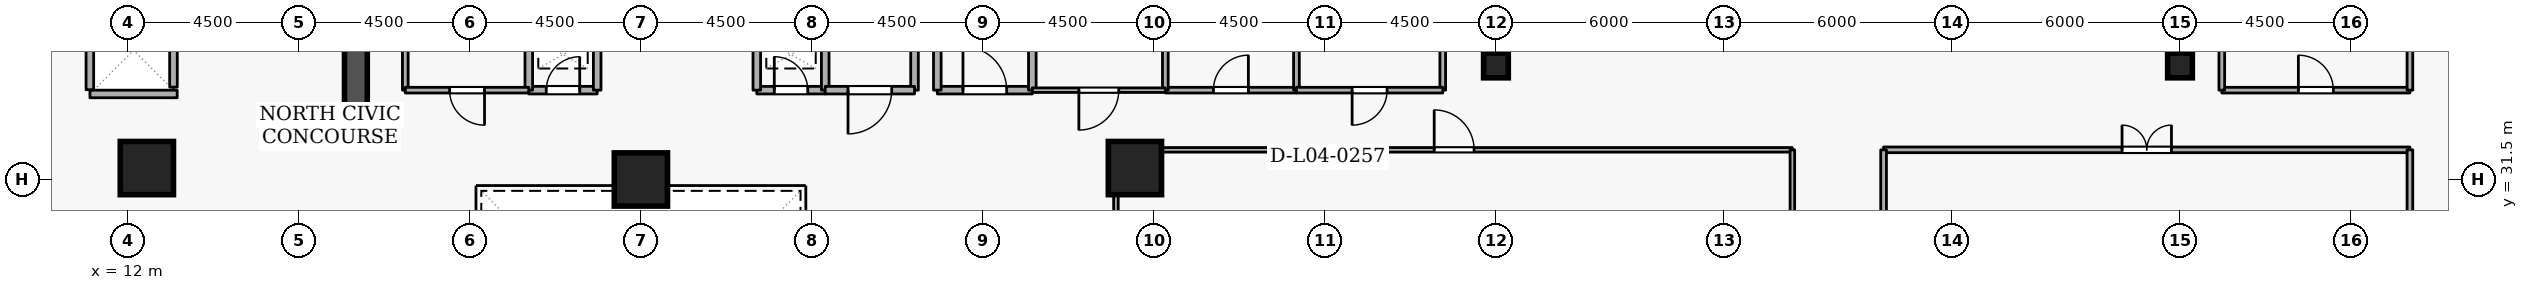
"""IFC4 building model, lengths in metres.
Left out: names, types, materials, properties, quantities, classifications, styles, units other than length and angle.
Written with IfcOpenShell. Run it as: python <this file> out.ifc"""

import sys

from ifc_helpers import new_model, si_unit, direction, frame, frame_2d, origin, origin_2d, place, context, subcontext, project, spatial, rectangle, extrude, element, fill, save


model = new_model("IFC4")
c1 = context("Model", 3, precision=1e-05, world=origin(), true_north=direction((0.0, 1.0)))
c2 = subcontext(c1, "Body", "Model", "MODEL_VIEW")
j1 = project(units=[si_unit("LENGTHUNIT", "METRE"), si_unit("PLANEANGLEUNIT", "RADIAN")], contexts=[c1])
p1 = place(None, origin())
s1 = spatial("IfcSite", under=j1, at=p1, CompositionType="ELEMENT")
p2 = place(p1, origin())
s2 = spatial("IfcBuilding", under=s1, at=p2, CompositionType="ELEMENT")
p3 = place(p2, frame((0.0, 0.0, 18.6)))
s3 = spatial("IfcBuildingStorey", under=s2, at=p3, CompositionType="ELEMENT", Elevation=18.6)
p4 = place(p3, frame((18.0, 33.1, 0.0), z_axis=(0.0, 0.0, 1.0), x_axis=(0.0, 1.0, 0.0)))
e1 = element("IfcWall", 1, at=p4, inside=s3, PredefinedType="SHEAR", context=c2, shape_type="SweptSolid", body=[
    extrude(rectangle(XDim=5.7, YDim=0.6, at=frame_2d((2.85, 0.0))), origin(), (0.0, 0.0, 1.0), 4.5),
])
for number, where, z_axis, x_axis in (
    (2, (12.5, 31.8, 0.0), (0.0, 0.0, 1.0), (1.0, 0.0, 0.0)),
    (3, (38.5, 31.8, 0.0), (0.0, 0.0, 1.0), (1.0, 0.0, 0.0)),
    (4, (25.5, 31.5, 0.0), (0.0, 0.0, 1.0), (1.0, 0.0, 0.0)),
):
    element("IfcColumn", number, at=place(p3, frame(where, z_axis=z_axis, x_axis=x_axis)), inside=s3, PredefinedType="COLUMN", context=c2, shape_type="SweptSolid", body=[
        extrude(rectangle(XDim=1.4, YDim=1.4, at=origin_2d()), origin(), (0.0, 0.0, 1.0), 4.5),
    ])
for number, where, z_axis, x_axis in (
    (5, (48.0, 34.5, 0.0), (0.0, 0.0, 1.0), (1.0, 0.0, 0.0)),
    (6, (66.0, 34.5, 0.0), (0.0, 0.0, 1.0), (1.0, 0.0, 0.0)),
):
    element("IfcColumn", number, at=place(p3, frame(where, z_axis=z_axis, x_axis=x_axis)), inside=s3, PredefinedType="COLUMN", context=c2, shape_type="SweptSolid", body=[
        extrude(rectangle(XDim=0.65, YDim=0.65, at=origin_2d()), origin(), (0.0, 0.0, 1.0), 4.5),
    ])
p5 = place(p3, frame((13.2, 33.93, 0.0), z_axis=(0.0, 0.0, 1.0), x_axis=(0.0, 1.0, 0.0)))
e7 = element("IfcWall", 7, at=p5, inside=s3, PredefinedType="STANDARD", context=c2, shape_type="SweptSolid", body=[
    extrude(rectangle(XDim=1.94, YDim=0.2, at=frame_2d((0.97, 0.0))), origin(), (0.0, 0.0, 1.0), 4.16),
])
p6 = place(p3, frame((11.002, 33.75, 0.0), z_axis=(0.0, 0.0, 1.0), x_axis=(1.0, 0.0, 0.0)))
e8 = element("IfcWall", 8, at=p6, inside=s3, PredefinedType="STANDARD", context=c2, shape_type="SweptSolid", body=[
    extrude(rectangle(XDim=2.296, YDim=0.2, at=frame_2d((1.148, 0.0))), origin(), (0.0, 0.0, 1.0), 4.16),
])
p7 = place(p3, frame((11.0, 33.862, 0.0), z_axis=(0.0, 0.0, 1.0), x_axis=(0.0, 1.0, 0.0)))
e9 = element("IfcWall", 9, at=p7, inside=s3, PredefinedType="STANDARD", context=c2, shape_type="SweptSolid", body=[
    extrude(rectangle(XDim=2.076, YDim=0.2, at=frame_2d((1.038, 0.0))), origin(), (0.0, 0.0, 1.0), 4.16),
])
p8 = place(p3, frame((33.3, 33.85, 0.0), z_axis=(0.0, 0.0, 1.0), x_axis=(1.0, 0.0, 0.0)))
e10 = element("IfcWall", 10, at=p8, inside=s3, PredefinedType="STANDARD", context=c2, shape_type="SweptSolid", body=[
    extrude(rectangle(XDim=2.5, YDim=0.2, at=frame_2d((1.25, 0.0))), origin(), (0.0, 0.0, 1.0), 4.16),
])
p9 = place(p8, frame((0.675, 0.0, 0.0)))
e11 = element("IfcOpeningElement", 11, at=p9, cuts=e10, PredefinedType="OPENING", context=c2, shape_type="SweptSolid", body=[
    extrude(rectangle(XDim=1.15, YDim=2.1, at=frame_2d((0.575, 1.05))), frame((0.0, 0.11, 0.0), z_axis=(0.0, -1.0, 0.0), x_axis=(1.0, 0.0, 0.0)), (0.0, 0.0, 1.0), 0.22),
])
p10 = place(p3, frame((35.8, 33.85, 0.0), z_axis=(0.0, 0.0, 1.0), x_axis=(0.0, 1.0, 0.0)))
e12 = element("IfcWall", 12, at=p10, inside=s3, PredefinedType="STANDARD", context=c2, shape_type="SweptSolid", body=[
    extrude(rectangle(XDim=5.15, YDim=0.2, at=frame_2d((2.575, 0.0))), origin(), (0.0, 0.0, 1.0), 4.16),
])
p11 = place(p3, frame((33.3, 35.6, 0.0), z_axis=(0.0, 0.0, 1.0), x_axis=(0.0, -1.0, 0.0)))
e13 = element("IfcWall", 13, at=p11, inside=s3, PredefinedType="STANDARD", context=c2, shape_type="SweptSolid", body=[
    extrude(rectangle(XDim=1.75, YDim=0.2, at=frame_2d((0.875, 0.0))), origin(), (0.0, 0.0, 1.0), 3.365),
])
p12 = place(p3, frame((22.55, 33.85, 0.0), z_axis=(0.0, 0.0, 1.0), x_axis=(1.0, 0.0, 0.0)))
e14 = element("IfcWall", 14, at=p12, inside=s3, PredefinedType="STANDARD", context=c2, shape_type="SweptSolid", body=[
    extrude(rectangle(XDim=1.8, YDim=0.2, at=frame_2d((0.9, 0.0))), origin(), (0.0, 0.0, 1.0), 4.16),
])
p13 = place(p12, frame((0.46, 0.0, 0.0)))
e15 = element("IfcOpeningElement", 15, at=p13, cuts=e14, PredefinedType="OPENING", context=c2, shape_type="SweptSolid", body=[
    extrude(rectangle(XDim=0.88, YDim=2.04, at=frame_2d((0.44, 1.02))), frame((0.0, 0.11, 0.0), z_axis=(0.0, -1.0, 0.0), x_axis=(1.0, 0.0, 0.0)), (0.0, 0.0, 1.0), 0.22),
])
for number, where, z_axis, x_axis in (
    (16, (24.35, 33.85, 0.0), (0.0, 0.0, 1.0), (0.0, 1.0, 0.0)),
    (17, (22.55, 35.35, 0.0), (0.0, 0.0, 1.0), (0.0, -1.0, 0.0)),
):
    element("IfcWall", number, at=place(p3, frame(where, z_axis=z_axis, x_axis=x_axis)), inside=s3, PredefinedType="STANDARD", context=c2, shape_type="SweptSolid", body=[
        extrude(rectangle(XDim=1.5, YDim=0.2, at=frame_2d((0.75, 0.0))), origin(), (0.0, 0.0, 1.0), 4.16),
    ])
p14 = place(p3, frame((28.55, 33.85, 0.0), z_axis=(0.0, 0.0, 1.0), x_axis=(1.0, 0.0, 0.0)))
e18 = element("IfcWall", 18, at=p14, inside=s3, PredefinedType="STANDARD", context=c2, shape_type="SweptSolid", body=[
    extrude(rectangle(XDim=1.8, YDim=0.2, at=frame_2d((0.9, 0.0))), origin(), (0.0, 0.0, 1.0), 4.16),
])
p15 = place(p14, frame((0.46, 0.0, 0.0)))
e19 = element("IfcOpeningElement", 19, at=p15, cuts=e18, PredefinedType="OPENING", context=c2, shape_type="SweptSolid", body=[
    extrude(rectangle(XDim=0.88, YDim=2.04, at=frame_2d((0.44, 1.02))), frame((0.0, 0.11, 0.0), z_axis=(0.0, -1.0, 0.0), x_axis=(1.0, 0.0, 0.0)), (0.0, 0.0, 1.0), 0.22),
])
for number, where, z_axis, x_axis in (
    (20, (30.35, 33.85, 0.0), (0.0, 0.0, 1.0), (0.0, 1.0, 0.0)),
    (21, (28.55, 35.35, 0.0), (0.0, 0.0, 1.0), (0.0, -1.0, 0.0)),
):
    element("IfcWall", number, at=place(p3, frame(where, z_axis=z_axis, x_axis=x_axis)), inside=s3, PredefinedType="STANDARD", context=c2, shape_type="SweptSolid", body=[
        extrude(rectangle(XDim=1.5, YDim=0.2, at=frame_2d((0.75, 0.0))), origin(), (0.0, 0.0, 1.0), 4.16),
    ])
p16 = place(p3, frame((32.7, 35.35, 0.0), z_axis=(0.0, 0.0, 1.0), x_axis=(0.0, -1.0, 0.0)))
e22 = element("IfcWall", 22, at=p16, inside=s3, PredefinedType="STANDARD", context=c2, shape_type="SweptSolid", body=[
    extrude(rectangle(XDim=1.5, YDim=0.2, at=frame_2d((0.75, 0.0))), origin(), (0.0, 0.0, 1.0), 3.365),
])
p17 = place(p3, frame((32.7, 33.85, 0.0), z_axis=(0.0, 0.0, 1.0), x_axis=(-1.0, 0.0, 0.0)))
e23 = element("IfcWall", 23, at=p17, inside=s3, PredefinedType="STANDARD", context=c2, shape_type="SweptSolid", body=[
    extrude(rectangle(XDim=2.35, YDim=0.2, at=frame_2d((1.175, 0.0))), origin(), (0.0, 0.0, 1.0), 4.16),
])
p18 = place(p17, frame((0.6, 0.0, 0.0)))
e24 = element("IfcOpeningElement", 24, at=p18, cuts=e23, PredefinedType="OPENING", context=c2, shape_type="SweptSolid", body=[
    extrude(rectangle(XDim=1.15, YDim=2.1, at=frame_2d((0.575, 1.05))), frame((0.0, 0.11, 0.0), z_axis=(0.0, -1.0, 0.0), x_axis=(1.0, 0.0, 0.0)), (0.0, 0.0, 1.0), 0.22),
])
p19 = place(p3, frame((19.3, 33.85, 0.0), z_axis=(0.0, 0.0, 1.0), x_axis=(0.0, 1.0, 0.0)))
e25 = element("IfcWall", 25, at=p19, inside=s3, PredefinedType="PARTITIONING", context=c2, shape_type="SweptSolid", body=[
    extrude(rectangle(XDim=1.5, YDim=0.15, at=frame_2d((0.75, 0.0))), origin(), (0.0, 0.0, 1.0), 4.16),
])
p20 = place(p3, frame((22.55, 33.85, 0.0), z_axis=(0.0, 0.0, 1.0), x_axis=(-1.0, 0.0, 0.0)))
e26 = element("IfcWall", 26, at=p20, inside=s3, PredefinedType="PARTITIONING", context=c2, shape_type="SweptSolid", body=[
    extrude(rectangle(XDim=3.25, YDim=0.15, at=frame_2d((1.625, 0.0))), origin(), (0.0, 0.0, 1.0), 4.16),
])
p21 = place(p20, frame((1.165, 0.0, 0.0)))
e27 = element("IfcOpeningElement", 27, at=p21, cuts=e26, PredefinedType="OPENING", context=c2, shape_type="SweptSolid", body=[
    extrude(rectangle(XDim=0.92, YDim=2.08, at=frame_2d((0.46, 1.04))), frame((0.0, 0.085, 0.0), z_axis=(0.0, -1.0, 0.0), x_axis=(1.0, 0.0, 0.0)), (0.0, 0.0, 1.0), 0.17),
])
p22 = place(p3, frame((39.3, 33.85, 0.0), z_axis=(0.0, 0.0, 1.0), x_axis=(1.0, 0.0, 0.0)))
e28 = element("IfcWall", 28, at=p22, inside=s3, PredefinedType="PARTITIONING", context=c2, shape_type="SweptSolid", body=[
    extrude(rectangle(XDim=3.45, YDim=0.15, at=frame_2d((1.725, 0.0))), origin(), (0.0, 0.0, 1.0), 4.16),
])
p23 = place(p22, frame((1.265, 0.0, 0.0)))
e29 = element("IfcOpeningElement", 29, at=p23, cuts=e28, PredefinedType="OPENING", context=c2, shape_type="SweptSolid", body=[
    extrude(rectangle(XDim=0.92, YDim=2.08, at=frame_2d((0.46, 1.04))), frame((0.0, 0.085, 0.0), z_axis=(0.0, -1.0, 0.0), x_axis=(1.0, 0.0, 0.0)), (0.0, 0.0, 1.0), 0.17),
])
p24 = place(p3, frame((42.75, 33.85, 0.0), z_axis=(0.0, 0.0, 1.0), x_axis=(0.0, 1.0, 0.0)))
e30 = element("IfcWall", 30, at=p24, inside=s3, PredefinedType="PARTITIONING", context=c2, shape_type="SweptSolid", body=[
    extrude(rectangle(XDim=3.95, YDim=0.15, at=frame_2d((1.975, 0.0))), origin(), (0.0, 0.0, 1.0), 3.395),
])
p25 = place(p3, frame((39.3, 37.8, 0.0), z_axis=(0.0, 0.0, 1.0), x_axis=(0.0, -1.0, 0.0)))
e31 = element("IfcWall", 31, at=p25, inside=s3, PredefinedType="PARTITIONING", context=c2, shape_type="SweptSolid", body=[
    extrude(rectangle(XDim=3.95, YDim=0.15, at=frame_2d((1.975, 0.0))), origin(), (0.0, 0.0, 1.0), 4.16),
])
p26 = place(p3, frame((67.1, 33.85, 0.0), z_axis=(0.0, 0.0, 1.0), x_axis=(1.0, 0.0, 0.0)))
e32 = element("IfcWall", 32, at=p26, inside=s3, PredefinedType="PARTITIONING", context=c2, shape_type="SweptSolid", body=[
    extrude(rectangle(XDim=4.95, YDim=0.15, at=frame_2d((2.475, 0.0))), origin(), (0.0, 0.0, 1.0), 4.16),
])
p27 = place(p26, frame((2.015, 0.0, 0.0)))
e33 = element("IfcOpeningElement", 33, at=p27, cuts=e32, PredefinedType="OPENING", context=c2, shape_type="SweptSolid", body=[
    extrude(rectangle(XDim=0.92, YDim=2.08, at=frame_2d((0.46, 1.04))), frame((0.0, 0.085, 0.0), z_axis=(0.0, -1.0, 0.0), x_axis=(1.0, 0.0, 0.0)), (0.0, 0.0, 1.0), 0.17),
])
for number, where, z_axis, x_axis in (
    (34, (72.05, 33.85, 0.0), (0.0, 0.0, 1.0), (0.0, 1.0, 0.0)),
    (35, (67.1, 37.8, 0.0), (0.0, 0.0, 1.0), (0.0, -1.0, 0.0)),
    (36, (46.6, 37.8, 0.0), (0.0, 0.0, 1.0), (0.0, -1.0, 0.0)),
):
    element("IfcWall", number, at=place(p3, frame(where, z_axis=z_axis, x_axis=x_axis)), inside=s3, PredefinedType="PARTITIONING", context=c2, shape_type="SweptSolid", body=[
        extrude(rectangle(XDim=3.95, YDim=0.15, at=frame_2d((1.975, 0.0))), origin(), (0.0, 0.0, 1.0), 4.16),
    ])
p28 = place(p3, frame((46.6, 33.85, 0.0), z_axis=(0.0, 0.0, 1.0), x_axis=(-1.0, 0.0, 0.0)))
e37 = element("IfcWall", 37, at=p28, inside=s3, PredefinedType="PARTITIONING", context=c2, shape_type="SweptSolid", body=[
    extrude(rectangle(XDim=3.85, YDim=0.15, at=frame_2d((1.925, 0.0))), origin(), (0.0, 0.0, 1.0), 4.16),
])
p29 = place(p28, frame((1.465, 0.0, 0.0)))
e38 = element("IfcOpeningElement", 38, at=p29, cuts=e37, PredefinedType="OPENING", context=c2, shape_type="SweptSolid", body=[
    extrude(rectangle(XDim=0.92, YDim=2.08, at=frame_2d((0.46, 1.04))), frame((0.0, 0.085, 0.0), z_axis=(0.0, -1.0, 0.0), x_axis=(1.0, 0.0, 0.0)), (0.0, 0.0, 1.0), 0.17),
])
p30 = place(p3, frame((38.0, 32.28, 0.0), z_axis=(0.0, 0.0, 1.0), x_axis=(1.0, 0.0, 0.0)))
e39 = element("IfcWall", 39, at=p30, inside=s3, PredefinedType="PARTITIONING", context=c2, shape_type="SweptSolid", body=[
    extrude(rectangle(XDim=17.8, YDim=0.12, at=frame_2d((8.9, 0.0))), origin(), (0.0, 0.0, 1.0), 4.16),
])
p31 = place(p30, frame((8.375, 0.0, 0.0)))
e40 = element("IfcOpeningElement", 40, at=p31, cuts=e39, PredefinedType="OPENING", context=c2, shape_type="SweptSolid", body=[
    extrude(rectangle(XDim=1.05, YDim=2.1, at=frame_2d((0.525, 1.05))), frame((0.0, 0.07, 0.0), z_axis=(0.0, -1.0, 0.0), x_axis=(1.0, 0.0, 0.0)), (0.0, 0.0, 1.0), 0.14),
])
for number, where, z_axis, x_axis in (
    (41, (55.8, 32.28, 0.0), (0.0, 0.0, 1.0), (0.0, -1.0, 0.0)),
    (42, (38.0, 22.3, 0.0), (0.0, 0.0, 1.0), (0.0, 1.0, 0.0)),
):
    element("IfcWall", number, at=place(p3, frame(where, z_axis=z_axis, x_axis=x_axis)), inside=s3, PredefinedType="PARTITIONING", context=c2, shape_type="SweptSolid", body=[
        extrude(rectangle(XDim=9.98, YDim=0.12, at=frame_2d((4.99, 0.0))), origin(), (0.0, 0.0, 1.0), 4.16),
    ])
p32 = place(p3, frame((58.2, 32.28, 0.0), z_axis=(0.0, 0.0, 1.0), x_axis=(1.0, 0.0, 0.0)))
e43 = element("IfcWall", 43, at=p32, inside=s3, PredefinedType="PARTITIONING", context=c2, shape_type="SweptSolid", body=[
    extrude(rectangle(XDim=13.85, YDim=0.15, at=frame_2d((6.925, 0.0))), origin(), (0.0, 0.0, 1.0), 4.16),
])
p33 = place(p32, frame((6.275, 0.0, 0.0)))
e44 = element("IfcOpeningElement", 44, at=p33, cuts=e43, PredefinedType="OPENING", context=c2, shape_type="SweptSolid", body=[
    extrude(rectangle(XDim=1.3, YDim=2.12, at=frame_2d((0.65, 1.06))), frame((0.0, 0.085, 0.0), z_axis=(0.0, -1.0, 0.0), x_axis=(1.0, 0.0, 0.0)), (0.0, 0.0, 1.0), 0.17),
])
for number, where, z_axis, x_axis in (
    (45, (72.05, 32.28, 0.0), (0.0, 0.0, 1.0), (0.0, -1.0, 0.0)),
    (46, (58.2, 22.3, 0.0), (0.0, 0.0, 1.0), (0.0, 1.0, 0.0)),
):
    element("IfcWall", number, at=place(p3, frame(where, z_axis=z_axis, x_axis=x_axis)), inside=s3, PredefinedType="PARTITIONING", context=c2, shape_type="SweptSolid", body=[
        extrude(rectangle(XDim=9.98, YDim=0.15, at=frame_2d((4.99, 0.0))), origin(), (0.0, 0.0, 1.0), 4.16),
    ])
p34 = place(p3, frame((39.3, 33.85, 0.0), z_axis=(0.0, 0.0, 1.0), x_axis=(-1.0, 0.0, 0.0)))
e47 = element("IfcWall", 47, at=p34, inside=s3, PredefinedType="PARTITIONING", context=c2, shape_type="SweptSolid", body=[
    extrude(rectangle(XDim=3.5, YDim=0.12, at=frame_2d((1.75, 0.0))), origin(), (0.0, 0.0, 1.0), 4.16),
])
p35 = place(p34, frame((1.225, 0.0, 0.0)))
e48 = element("IfcOpeningElement", 48, at=p35, cuts=e47, PredefinedType="OPENING", context=c2, shape_type="SweptSolid", body=[
    extrude(rectangle(XDim=1.05, YDim=2.1, at=frame_2d((0.525, 1.05))), frame((0.0, 0.07, 0.0), z_axis=(0.0, -1.0, 0.0), x_axis=(1.0, 0.0, 0.0)), (0.0, 0.0, 1.0), 0.14),
])
p36 = place(p9, origin())
e49 = element("IfcDoor", 49, at=p36, inside=s3, OperationType="SINGLE_SWING_LEFT", PredefinedType="DOOR", context=c2, shape_type="SweptSolid", body=[
    extrude(rectangle(XDim=1.15, YDim=2.1, at=frame_2d((0.575, 1.05))), frame((0.0, 0.025, 0.0), z_axis=(0.0, -1.0, 0.0), x_axis=(1.0, 0.0, 0.0)), (0.0, 0.0, 1.0), 0.05),
])
fill(e11, e49)
p37 = place(p13, origin())
e50 = element("IfcDoor", 50, at=p37, inside=s3, OperationType="SINGLE_SWING_RIGHT", PredefinedType="DOOR", context=c2, shape_type="SweptSolid", body=[
    extrude(rectangle(XDim=0.88, YDim=2.04, at=frame_2d((0.44, 1.02))), frame((0.0, 0.025, 0.0), z_axis=(0.0, -1.0, 0.0), x_axis=(1.0, 0.0, 0.0)), (0.0, 0.0, 1.0), 0.05),
])
fill(e15, e50)
p38 = place(p15, origin())
e51 = element("IfcDoor", 51, at=p38, inside=s3, OperationType="SINGLE_SWING_LEFT", PredefinedType="DOOR", context=c2, shape_type="SweptSolid", body=[
    extrude(rectangle(XDim=0.88, YDim=2.04, at=frame_2d((0.44, 1.02))), frame((0.0, 0.025, 0.0), z_axis=(0.0, -1.0, 0.0), x_axis=(1.0, 0.0, 0.0)), (0.0, 0.0, 1.0), 0.05),
])
fill(e19, e51)
p39 = place(p21, origin())
e52 = element("IfcDoor", 52, at=p39, inside=s3, OperationType="SINGLE_SWING_LEFT", PredefinedType="DOOR", context=c2, shape_type="SweptSolid", body=[
    extrude(rectangle(XDim=0.92, YDim=2.08, at=frame_2d((0.46, 1.04))), frame((0.0, 0.025, 0.0), z_axis=(0.0, -1.0, 0.0), x_axis=(1.0, 0.0, 0.0)), (0.0, 0.0, 1.0), 0.05),
])
fill(e27, e52)
p40 = place(p18, origin())
e53 = element("IfcDoor", 53, at=p40, inside=s3, OperationType="SINGLE_SWING_RIGHT", PredefinedType="DOOR", context=c2, shape_type="SweptSolid", body=[
    extrude(rectangle(XDim=1.15, YDim=2.1, at=frame_2d((0.575, 1.05))), frame((0.0, 0.025, 0.0), z_axis=(0.0, -1.0, 0.0), x_axis=(1.0, 0.0, 0.0)), (0.0, 0.0, 1.0), 0.05),
])
fill(e24, e53)
p41 = place(p23, origin())
e54 = element("IfcDoor", 54, at=p41, inside=s3, OperationType="SINGLE_SWING_RIGHT", PredefinedType="DOOR", context=c2, shape_type="SweptSolid", body=[
    extrude(rectangle(XDim=0.92, YDim=2.08, at=frame_2d((0.46, 1.04))), frame((0.0, 0.025, 0.0), z_axis=(0.0, -1.0, 0.0), x_axis=(1.0, 0.0, 0.0)), (0.0, 0.0, 1.0), 0.05),
])
fill(e29, e54)
p42 = place(p27, origin())
e55 = element("IfcDoor", 55, at=p42, inside=s3, OperationType="SINGLE_SWING_LEFT", PredefinedType="DOOR", context=c2, shape_type="SweptSolid", body=[
    extrude(rectangle(XDim=0.92, YDim=2.08, at=frame_2d((0.46, 1.04))), frame((0.0, 0.025, 0.0), z_axis=(0.0, -1.0, 0.0), x_axis=(1.0, 0.0, 0.0)), (0.0, 0.0, 1.0), 0.05),
])
fill(e33, e55)
p43 = place(p29, origin())
e56 = element("IfcDoor", 56, at=p43, inside=s3, OperationType="SINGLE_SWING_RIGHT", PredefinedType="DOOR", context=c2, shape_type="SweptSolid", body=[
    extrude(rectangle(XDim=0.92, YDim=2.08, at=frame_2d((0.46, 1.04))), frame((0.0, 0.025, 0.0), z_axis=(0.0, -1.0, 0.0), x_axis=(1.0, 0.0, 0.0)), (0.0, 0.0, 1.0), 0.05),
])
fill(e38, e56)
p44 = place(p31, origin())
e57 = element("IfcDoor", 57, at=p44, inside=s3, OperationType="SINGLE_SWING_LEFT", PredefinedType="DOOR", context=c2, shape_type="SweptSolid", body=[
    extrude(rectangle(XDim=1.05, YDim=2.1, at=frame_2d((0.525, 1.05))), frame((0.0, 0.025, 0.0), z_axis=(0.0, -1.0, 0.0), x_axis=(1.0, 0.0, 0.0)), (0.0, 0.0, 1.0), 0.05),
])
fill(e40, e57)
p45 = place(p33, origin())
e58 = element("IfcDoor", 58, at=p45, inside=s3, OperationType="DOUBLE_DOOR_SINGLE_SWING", PredefinedType="DOOR", context=c2, shape_type="SweptSolid", body=[
    extrude(rectangle(XDim=1.3, YDim=2.12, at=frame_2d((0.65, 1.06))), frame((0.0, 0.025, 0.0), z_axis=(0.0, -1.0, 0.0), x_axis=(1.0, 0.0, 0.0)), (0.0, 0.0, 1.0), 0.05),
])
fill(e44, e58)
p46 = place(p35, origin())
e59 = element("IfcDoor", 59, at=p46, inside=s3, OperationType="SINGLE_SWING_RIGHT", PredefinedType="DOOR", context=c2, shape_type="SweptSolid", body=[
    extrude(rectangle(XDim=1.05, YDim=2.1, at=frame_2d((0.525, 1.05))), frame((0.0, 0.025, 0.0), z_axis=(0.0, -1.0, 0.0), x_axis=(1.0, 0.0, 0.0)), (0.0, 0.0, 1.0), 0.05),
])
fill(e48, e59)
save(model, sys.argv[1])
